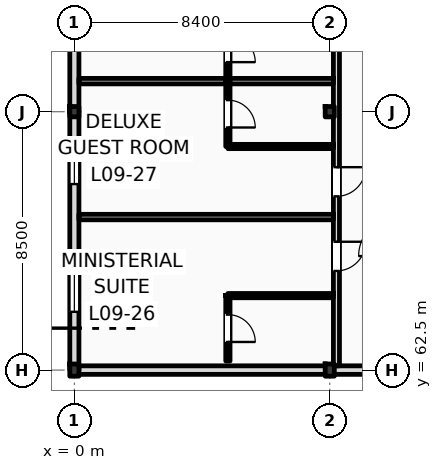
"""IFC4 building model, lengths in metres.
Left out: names, types, materials, properties, quantities, classifications, styles, units other than length and angle.
Written with IfcOpenShell. Run it as: python <this file> out.ifc"""

import sys

from ifc_helpers import new_model, si_unit, direction, frame, frame_2d, origin, origin_2d, place, context, subcontext, project, spatial, rectangle, i_section, extrude, element, fill, save


model = new_model("IFC4")
c1 = context("Model", 3, precision=1e-05, world=origin(), true_north=direction((0.0, 1.0)))
c2 = subcontext(c1, "Body", "Model", "MODEL_VIEW")
j1 = project(units=[si_unit("LENGTHUNIT", "METRE"), si_unit("PLANEANGLEUNIT", "RADIAN")], contexts=[c1])
p1 = place(None, origin())
s1 = spatial("IfcSite", under=j1, at=p1, CompositionType="ELEMENT")
p2 = place(p1, origin())
s2 = spatial("IfcBuilding", under=s1, at=p2, CompositionType="ELEMENT")
p3 = place(p2, frame((0.0, 0.0, 39.0)))
s3 = spatial("IfcBuildingStorey", under=s2, at=p3, CompositionType="ELEMENT", Elevation=39.0)
p4 = place(p3, frame((0.0, 62.5, 0.0), z_axis=(0.0, 0.0, 1.0), x_axis=(1.0, 0.0, 0.0)))
e1 = element("IfcColumn", 1, at=p4, inside=s3, PredefinedType="COLUMN", context=c2, shape_type="SweptSolid", body=[
    extrude(i_section(OverallWidth=0.3, OverallDepth=0.4, WebThickness=0.013, FlangeThickness=0.024, FilletRadius=0.027, at=origin_2d()), origin(), (0.0, 0.0, 1.0), 3.6),
])
p5 = place(p3, frame((0.0, 71.0, 0.0), z_axis=(0.0, 0.0, 1.0), x_axis=(1.0, 0.0, 0.0)))
e2 = element("IfcColumn", 2, at=p5, inside=s3, PredefinedType="COLUMN", context=c2, shape_type="SweptSolid", body=[
    extrude(i_section(OverallWidth=0.3, OverallDepth=0.34, WebThickness=0.012, FlangeThickness=0.021, FilletRadius=0.027, at=origin_2d()), origin(), (0.0, 0.0, 1.0), 3.6),
])
p6 = place(p3, frame((8.4, 62.5, 0.0), z_axis=(0.0, 0.0, 1.0), x_axis=(1.0, 0.0, 0.0)))
e3 = element("IfcColumn", 3, at=p6, inside=s3, PredefinedType="COLUMN", context=c2, shape_type="SweptSolid", body=[
    extrude(i_section(OverallWidth=0.3, OverallDepth=0.4, WebThickness=0.013, FlangeThickness=0.024, FilletRadius=0.027, at=origin_2d()), origin(), (0.0, 0.0, 1.0), 3.6),
])
p7 = place(p3, frame((8.4, 71.0, 0.0), z_axis=(0.0, 0.0, 1.0), x_axis=(1.0, 0.0, 0.0)))
e4 = element("IfcColumn", 4, at=p7, inside=s3, PredefinedType="COLUMN", context=c2, shape_type="SweptSolid", body=[
    extrude(i_section(OverallWidth=0.3, OverallDepth=0.34, WebThickness=0.012, FlangeThickness=0.021, FilletRadius=0.027, at=origin_2d()), origin(), (0.0, 0.0, 1.0), 3.6),
])
p8 = place(p3, frame((0.0, 62.5, 0.0), z_axis=(0.0, 0.0, 1.0), x_axis=(0.0, 1.0, 0.0)))
e5 = element("IfcWall", 5, at=p8, inside=s3, PredefinedType="STANDARD", context=c2, shape_type="SweptSolid", body=[
    extrude(rectangle(XDim=8.5, YDim=0.3, at=frame_2d((4.25, 0.0))), origin(), (0.0, 0.0, 1.0), 2.91),
])
p9 = place(p8, frame((1.917, 0.0, 0.9)))
e6 = element("IfcOpeningElement", 6, at=p9, cuts=e5, PredefinedType="OPENING", context=c2, shape_type="SweptSolid", body=[
    extrude(rectangle(XDim=1.5, YDim=1.83, at=frame_2d((0.75, 0.915))), frame((0.0, 0.16, 0.0), z_axis=(0.0, -1.0, 0.0), x_axis=(1.0, 0.0, 0.0)), (0.0, 0.0, 1.0), 0.32),
])
p10 = place(p8, frame((6.119, 0.0, 0.9)))
e7 = element("IfcOpeningElement", 7, at=p10, cuts=e5, PredefinedType="OPENING", context=c2, shape_type="SweptSolid", body=[
    extrude(rectangle(XDim=1.5, YDim=1.83, at=frame_2d((0.75, 0.915))), frame((0.0, 0.16, 0.0), z_axis=(0.0, -1.0, 0.0), x_axis=(1.0, 0.0, 0.0)), (0.0, 0.0, 1.0), 0.32),
])
p11 = place(p3, frame((0.0, 71.0, 0.0), z_axis=(0.0, 0.0, 1.0), x_axis=(0.0, 1.0, 0.0)))
e8 = element("IfcWall", 8, at=p11, inside=s3, PredefinedType="STANDARD", context=c2, shape_type="SweptSolid", body=[
    extrude(rectangle(XDim=8.5, YDim=0.3, at=frame_2d((4.25, 0.0))), origin(), (0.0, 0.0, 1.0), 2.91),
])
p12 = place(p11, frame((2.648, 0.0, 0.9)))
e9 = element("IfcOpeningElement", 9, at=p12, cuts=e8, PredefinedType="OPENING", context=c2, shape_type="SweptSolid", body=[
    extrude(rectangle(XDim=1.5, YDim=1.83, at=frame_2d((0.75, 0.915))), frame((0.0, 0.16, 0.0), z_axis=(0.0, -1.0, 0.0), x_axis=(1.0, 0.0, 0.0)), (0.0, 0.0, 1.0), 0.32),
])
p13 = place(p11, frame((6.2, 0.0, 0.9)))
e10 = element("IfcOpeningElement", 10, at=p13, cuts=e8, PredefinedType="OPENING", context=c2, shape_type="SweptSolid", body=[
    extrude(rectangle(XDim=1.5, YDim=1.83, at=frame_2d((0.75, 0.915))), frame((0.0, 0.16, 0.0), z_axis=(0.0, -1.0, 0.0), x_axis=(1.0, 0.0, 0.0)), (0.0, 0.0, 1.0), 0.32),
])
p14 = place(p3, frame((0.0, 62.5, 0.0), z_axis=(0.0, 0.0, 1.0), x_axis=(1.0, 0.0, 0.0)))
e11 = element("IfcWall", 11, at=p14, inside=s3, PredefinedType="STANDARD", context=c2, shape_type="SweptSolid", body=[
    extrude(rectangle(XDim=25.2, YDim=0.28, at=frame_2d((12.6, 0.0))), origin(), (0.0, 0.0, 1.0), 2.72),
])
p15 = place(p3, frame((8.62, 62.64, 0.0), z_axis=(0.0, 0.0, 1.0), x_axis=(0.0, 1.0, 0.0)))
e12 = element("IfcWall", 12, at=p15, inside=s3, PredefinedType="PARTITIONING", context=c2, shape_type="SweptSolid", body=[
    extrude(rectangle(XDim=32.66, YDim=0.2, at=frame_2d((16.33, 0.0))), origin(), (0.0, 0.0, 1.0), 2.91),
])
p16 = place(p15, frame((3.122, 0.0, 0.0)))
e13 = element("IfcOpeningElement", 13, at=p16, cuts=e12, PredefinedType="OPENING", context=c2, shape_type="SweptSolid", body=[
    extrude(rectangle(XDim=0.96, YDim=2.2, at=frame_2d((0.48, 1.1))), frame((0.0, 0.11, 0.0), z_axis=(0.0, -1.0, 0.0), x_axis=(1.0, 0.0, 0.0)), (0.0, 0.0, 1.0), 0.22),
])
p17 = place(p15, frame((5.575, 0.0, 0.0)))
e14 = element("IfcOpeningElement", 14, at=p17, cuts=e12, PredefinedType="OPENING", context=c2, shape_type="SweptSolid", body=[
    extrude(rectangle(XDim=0.96, YDim=2.2, at=frame_2d((0.48, 1.1))), frame((0.0, 0.11, 0.0), z_axis=(0.0, -1.0, 0.0), x_axis=(1.0, 0.0, 0.0)), (0.0, 0.0, 1.0), 0.22),
])
p18 = place(p15, frame((12.353, 0.0, 0.0)))
e15 = element("IfcOpeningElement", 15, at=p18, cuts=e12, PredefinedType="OPENING", context=c2, shape_type="SweptSolid", body=[
    extrude(rectangle(XDim=0.96, YDim=2.2, at=frame_2d((0.48, 1.1))), frame((0.0, 0.11, 0.0), z_axis=(0.0, -1.0, 0.0), x_axis=(1.0, 0.0, 0.0)), (0.0, 0.0, 1.0), 0.22),
])
p19 = place(p15, frame((14.581, 0.0, 0.0)))
e16 = element("IfcOpeningElement", 16, at=p19, cuts=e12, PredefinedType="OPENING", context=c2, shape_type="SweptSolid", body=[
    extrude(rectangle(XDim=0.96, YDim=2.2, at=frame_2d((0.48, 1.1))), frame((0.0, 0.11, 0.0), z_axis=(0.0, -1.0, 0.0), x_axis=(1.0, 0.0, 0.0)), (0.0, 0.0, 1.0), 0.22),
])
p20 = place(p15, frame((21.61, 0.0, 0.0)))
e17 = element("IfcOpeningElement", 17, at=p20, cuts=e12, PredefinedType="OPENING", context=c2, shape_type="SweptSolid", body=[
    extrude(rectangle(XDim=0.96, YDim=2.2, at=frame_2d((0.48, 1.1))), frame((0.0, 0.11, 0.0), z_axis=(0.0, -1.0, 0.0), x_axis=(1.0, 0.0, 0.0)), (0.0, 0.0, 1.0), 0.22),
])
p21 = place(p15, frame((26.488, 0.0, 0.0)))
e18 = element("IfcOpeningElement", 18, at=p21, cuts=e12, PredefinedType="OPENING", context=c2, shape_type="SweptSolid", body=[
    extrude(rectangle(XDim=0.96, YDim=2.2, at=frame_2d((0.48, 1.1))), frame((0.0, 0.11, 0.0), z_axis=(0.0, -1.0, 0.0), x_axis=(1.0, 0.0, 0.0)), (0.0, 0.0, 1.0), 0.22),
])
p22 = place(p15, frame((30.814, 0.0, 0.0)))
e19 = element("IfcOpeningElement", 19, at=p22, cuts=e12, PredefinedType="OPENING", context=c2, shape_type="SweptSolid", body=[
    extrude(rectangle(XDim=0.96, YDim=2.2, at=frame_2d((0.48, 1.1))), frame((0.0, 0.11, 0.0), z_axis=(0.0, -1.0, 0.0), x_axis=(1.0, 0.0, 0.0)), (0.0, 0.0, 1.0), 0.22),
])
p23 = place(p3, frame((0.15, 67.534, 0.0), z_axis=(0.0, 0.0, 1.0), x_axis=(1.0, 0.0, 0.0)))
e20 = element("IfcWall", 20, at=p23, inside=s3, PredefinedType="PARTITIONING", context=c2, shape_type="SweptSolid", body=[
    extrude(rectangle(XDim=8.37, YDim=0.18, at=frame_2d((4.185, 0.0))), origin(), (0.0, 0.0, 1.0), 3.38),
])
p24 = place(p3, frame((5.05, 64.95, 0.0), z_axis=(0.0, 0.0, 1.0), x_axis=(1.0, 0.0, 0.0)))
e21 = element("IfcWall", 21, at=p24, inside=s3, PredefinedType="PARTITIONING", context=c2, shape_type="SweptSolid", body=[
    extrude(rectangle(XDim=3.47, YDim=0.14, at=frame_2d((1.735, 0.0))), origin(), (0.0, 0.0, 1.0), 3.38),
])
p25 = place(p3, frame((5.05, 62.8, 0.0), z_axis=(0.0, 0.0, 1.0), x_axis=(0.0, 1.0, 0.0)))
e22 = element("IfcWall", 22, at=p25, inside=s3, PredefinedType="PARTITIONING", context=c2, shape_type="SweptSolid", body=[
    extrude(rectangle(XDim=2.15, YDim=0.14, at=frame_2d((1.075, 0.0))), origin(), (0.0, 0.0, 1.0), 3.38),
])
p26 = place(p25, frame((0.625, 0.0, 0.0)))
e23 = element("IfcOpeningElement", 23, at=p26, cuts=e22, PredefinedType="OPENING", context=c2, shape_type="SweptSolid", body=[
    extrude(rectangle(XDim=0.9, YDim=2.1, at=frame_2d((0.45, 1.05))), frame((0.0, 0.08, 0.0), z_axis=(0.0, -1.0, 0.0), x_axis=(1.0, 0.0, 0.0)), (0.0, 0.0, 1.0), 0.16),
])
p27 = place(p3, frame((0.15, 72.005, 0.0), z_axis=(0.0, 0.0, 1.0), x_axis=(1.0, 0.0, 0.0)))
e24 = element("IfcWall", 24, at=p27, inside=s3, PredefinedType="PARTITIONING", context=c2, shape_type="SweptSolid", body=[
    extrude(rectangle(XDim=8.37, YDim=0.18, at=frame_2d((4.185, 0.0))), origin(), (0.0, 0.0, 1.0), 3.38),
])
p28 = place(p3, frame((5.05, 69.855, 0.0), z_axis=(0.0, 0.0, 1.0), x_axis=(1.0, 0.0, 0.0)))
e25 = element("IfcWall", 25, at=p28, inside=s3, PredefinedType="PARTITIONING", context=c2, shape_type="SweptSolid", body=[
    extrude(rectangle(XDim=3.47, YDim=0.14, at=frame_2d((1.735, 0.0))), origin(), (0.0, 0.0, 1.0), 3.38),
])
p29 = place(p3, frame((5.05, 69.855, 0.0), z_axis=(0.0, 0.0, 1.0), x_axis=(0.0, 1.0, 0.0)))
e26 = element("IfcWall", 26, at=p29, inside=s3, PredefinedType="PARTITIONING", context=c2, shape_type="SweptSolid", body=[
    extrude(rectangle(XDim=2.15, YDim=0.14, at=frame_2d((1.075, 0.0))), origin(), (0.0, 0.0, 1.0), 3.38),
])
p30 = place(p29, frame((0.625, 0.0, 0.0)))
e27 = element("IfcOpeningElement", 27, at=p30, cuts=e26, PredefinedType="OPENING", context=c2, shape_type="SweptSolid", body=[
    extrude(rectangle(XDim=0.9, YDim=2.1, at=frame_2d((0.45, 1.05))), frame((0.0, 0.08, 0.0), z_axis=(0.0, -1.0, 0.0), x_axis=(1.0, 0.0, 0.0)), (0.0, 0.0, 1.0), 0.16),
])
p31 = place(p3, frame((5.05, 72.005, 0.0), z_axis=(0.0, 0.0, 1.0), x_axis=(0.0, 1.0, 0.0)))
e28 = element("IfcWall", 28, at=p31, inside=s3, PredefinedType="PARTITIONING", context=c2, shape_type="SweptSolid", body=[
    extrude(rectangle(XDim=2.15, YDim=0.14, at=frame_2d((1.075, 0.0))), origin(), (0.0, 0.0, 1.0), 3.38),
])
p32 = place(p31, frame((0.625, 0.0, 0.0)))
e29 = element("IfcOpeningElement", 29, at=p32, cuts=e28, PredefinedType="OPENING", context=c2, shape_type="SweptSolid", body=[
    extrude(rectangle(XDim=0.9, YDim=2.1, at=frame_2d((0.45, 1.05))), frame((0.0, 0.08, 0.0), z_axis=(0.0, -1.0, 0.0), x_axis=(1.0, 0.0, 0.0)), (0.0, 0.0, 1.0), 0.16),
])
p33 = place(p9, origin())
e30 = element("IfcWindow", 30, at=p33, inside=s3, PartitioningType="DOUBLE_PANEL_VERTICAL", PredefinedType="WINDOW", context=c2, shape_type="SweptSolid", body=[
    extrude(rectangle(XDim=1.5, YDim=1.83, at=frame_2d((0.75, 0.915))), frame((0.0, 0.03, 0.0), z_axis=(0.0, -1.0, 0.0), x_axis=(1.0, 0.0, 0.0)), (0.0, 0.0, 1.0), 0.06),
])
fill(e6, e30)
p34 = place(p10, origin())
e31 = element("IfcWindow", 31, at=p34, inside=s3, PartitioningType="DOUBLE_PANEL_VERTICAL", PredefinedType="WINDOW", context=c2, shape_type="SweptSolid", body=[
    extrude(rectangle(XDim=1.5, YDim=1.83, at=frame_2d((0.75, 0.915))), frame((0.0, 0.03, 0.0), z_axis=(0.0, -1.0, 0.0), x_axis=(1.0, 0.0, 0.0)), (0.0, 0.0, 1.0), 0.06),
])
fill(e7, e31)
p35 = place(p16, frame((0.96, 0.0, 0.0), z_axis=(0.0, 0.0, 1.0), x_axis=(-1.0, 0.0, 0.0)))
e32 = element("IfcDoor", 32, at=p35, inside=s3, OperationType="SINGLE_SWING_RIGHT", PredefinedType="DOOR", context=c2, shape_type="SweptSolid", body=[
    extrude(rectangle(XDim=0.96, YDim=2.2, at=frame_2d((0.48, 1.1))), frame((0.0, 0.025, 0.0), z_axis=(0.0, -1.0, 0.0), x_axis=(1.0, 0.0, 0.0)), (0.0, 0.0, 1.0), 0.05),
])
fill(e13, e32)
p36 = place(p26, frame((0.9, 0.0, 0.0), z_axis=(0.0, 0.0, 1.0), x_axis=(-1.0, 0.0, 0.0)))
e33 = element("IfcDoor", 33, at=p36, inside=s3, OperationType="SINGLE_SWING_LEFT", PredefinedType="DOOR", context=c2, shape_type="SweptSolid", body=[
    extrude(rectangle(XDim=0.9, YDim=2.1, at=frame_2d((0.45, 1.05))), frame((0.0, 0.025, 0.0), z_axis=(0.0, -1.0, 0.0), x_axis=(1.0, 0.0, 0.0)), (0.0, 0.0, 1.0), 0.05),
])
fill(e23, e33)
p37 = place(p17, frame((0.96, 0.0, 0.0), z_axis=(0.0, 0.0, 1.0), x_axis=(-1.0, 0.0, 0.0)))
e34 = element("IfcDoor", 34, at=p37, inside=s3, OperationType="SINGLE_SWING_RIGHT", PredefinedType="DOOR", context=c2, shape_type="SweptSolid", body=[
    extrude(rectangle(XDim=0.96, YDim=2.2, at=frame_2d((0.48, 1.1))), frame((0.0, 0.025, 0.0), z_axis=(0.0, -1.0, 0.0), x_axis=(1.0, 0.0, 0.0)), (0.0, 0.0, 1.0), 0.05),
])
fill(e14, e34)
p38 = place(p30, frame((0.9, 0.0, 0.0), z_axis=(0.0, 0.0, 1.0), x_axis=(-1.0, 0.0, 0.0)))
e35 = element("IfcDoor", 35, at=p38, inside=s3, OperationType="SINGLE_SWING_LEFT", PredefinedType="DOOR", context=c2, shape_type="SweptSolid", body=[
    extrude(rectangle(XDim=0.9, YDim=2.1, at=frame_2d((0.45, 1.05))), frame((0.0, 0.025, 0.0), z_axis=(0.0, -1.0, 0.0), x_axis=(1.0, 0.0, 0.0)), (0.0, 0.0, 1.0), 0.05),
])
fill(e27, e35)
p39 = place(p32, frame((0.9, 0.0, 0.0), z_axis=(0.0, 0.0, 1.0), x_axis=(-1.0, 0.0, 0.0)))
e36 = element("IfcDoor", 36, at=p39, inside=s3, OperationType="SINGLE_SWING_LEFT", PredefinedType="DOOR", context=c2, shape_type="SweptSolid", body=[
    extrude(rectangle(XDim=0.9, YDim=2.1, at=frame_2d((0.45, 1.05))), frame((0.0, 0.025, 0.0), z_axis=(0.0, -1.0, 0.0), x_axis=(1.0, 0.0, 0.0)), (0.0, 0.0, 1.0), 0.05),
])
fill(e29, e36)
save(model, sys.argv[1])
